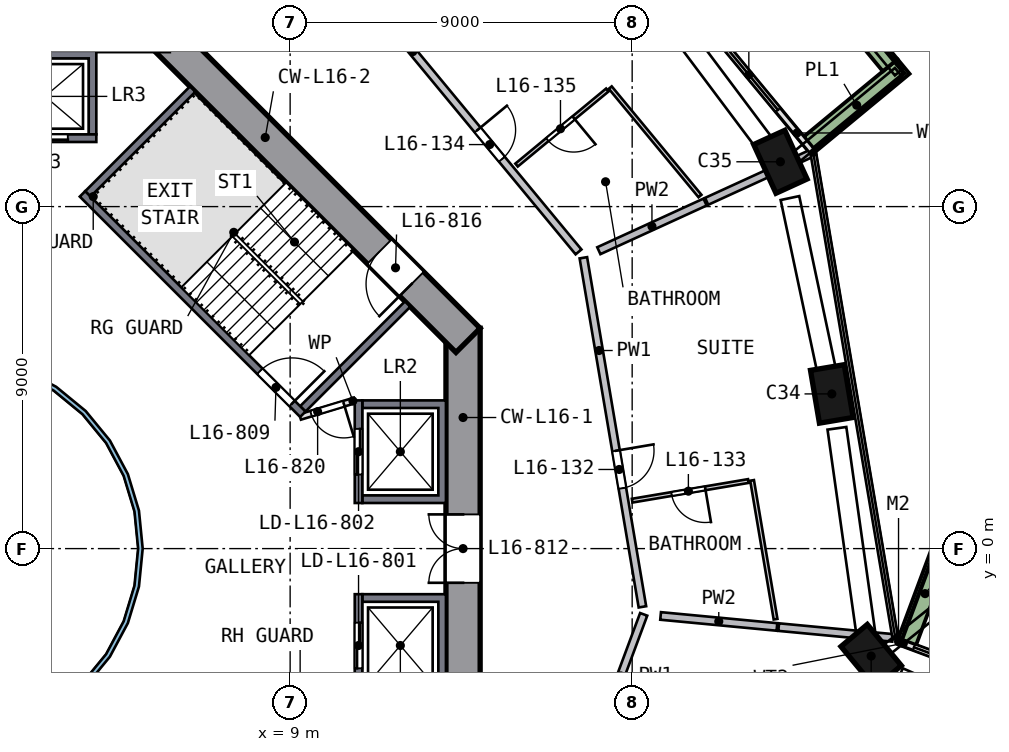
"""IFC4 building model, lengths in metres.
Left out: names, types, materials, properties, quantities, classifications, styles, units other than length and angle.
Written with IfcOpenShell. Run it as: python <this file> out.ifc"""

import sys

from ifc_helpers import new_model, si_unit, direction, frame, frame_2d, origin, origin_2d, place, context, subcontext, project, spatial, polyline, rectangle, outline, extrude, element, fill, save


model = new_model("IFC4")
c1 = context("Model", 3, precision=1e-05, world=origin(), true_north=direction((0.0, 1.0)))
c2 = subcontext(c1, "Body", "Model", "MODEL_VIEW")
j1 = project(units=[si_unit("LENGTHUNIT", "METRE"), si_unit("PLANEANGLEUNIT", "RADIAN")], contexts=[c1])
p1 = place(None, origin())
s1 = spatial("IfcSite", under=j1, at=p1, CompositionType="ELEMENT")
p2 = place(p1, origin())
s2 = spatial("IfcBuilding", under=s1, at=p2, CompositionType="ELEMENT")
p3 = place(p2, frame((0.0, 0.0, 71.5)))
s3 = spatial("IfcBuildingStorey", under=s2, at=p3, CompositionType="ELEMENT", Elevation=71.5)
p4 = place(p3, frame((24.273, -2.967, 0.0), z_axis=(0.013094218, 0.115503939, 0.993220711), x_axis=(0.640850903, -0.763450363, 0.080334694)))
e1 = element("IfcColumn", 1, at=p4, inside=s3, PredefinedType="COLUMN", context=c2, shape_type="SweptSolid", body=[
    extrude(rectangle(XDim=1.4, YDim=0.9, at=origin_2d()), origin(), (0.0, 0.0, 1.0), 3.021),
])
p5 = place(p3, frame((23.278, 3.937, 0.0), z_axis=(-0.019569342, 0.110623387, 0.993669717), x_axis=(-0.164784415, 0.979911476, -0.112336973)))
e2 = element("IfcColumn", 2, at=p5, inside=s3, PredefinedType="COLUMN", context=c2, shape_type="SweptSolid", body=[
    extrude(rectangle(XDim=1.4, YDim=0.9, at=origin_2d()), origin(), (0.0, 0.0, 1.0), 3.019),
])
p6 = place(p3, frame((21.959, 10.054, 0.0), z_axis=(-0.048666634, 0.104043119, 0.993381391), x_axis=(0.413236233, -0.903351173, 0.114858494)))
e3 = element("IfcColumn", 3, at=p6, inside=s3, PredefinedType="COLUMN", context=c2, shape_type="SweptSolid", body=[
    extrude(rectangle(XDim=1.4, YDim=0.9, at=origin_2d()), origin(), (0.0, 0.0, 1.0), 3.02),
])
p7 = place(p3, frame((13.55, -5.799, 0.0), z_axis=(0.0, 0.0, 1.0), x_axis=(0.0, 1.0, 0.0)))
e4 = element("IfcWall", 4, at=p7, inside=s3, PredefinedType="SHEAR", context=c2, shape_type="SweptSolid", body=[
    extrude(rectangle(XDim=11.598, YDim=0.9, at=frame_2d((5.799, 0.0))), origin(), (0.0, 0.0, 1.0), 3.5),
])
p8 = place(p7, frame((4.899, 0.0, 0.0)))
e5 = element("IfcOpeningElement", 5, at=p8, cuts=e4, PredefinedType="OPENING", context=c2, shape_type="SweptSolid", body=[
    extrude(rectangle(XDim=1.8, YDim=2.1, at=frame_2d((0.9, 1.05))), frame((0.0, 0.46, 0.0), z_axis=(0.0, -1.0, 0.0), x_axis=(1.0, 0.0, 0.0)), (0.0, 0.0, 1.0), 0.92),
])
p9 = place(p3, frame((13.682, 5.481, 0.0), z_axis=(0.0, 0.0, 1.0), x_axis=(-0.707106781, 0.707106781, 0.0)))
e6 = element("IfcWall", 6, at=p9, inside=s3, PredefinedType="SHEAR", context=c2, shape_type="SweptSolid", body=[
    extrude(rectangle(XDim=11.598, YDim=0.9, at=frame_2d((5.799, 0.0))), origin(), (0.0, 0.0, 1.0), 3.5),
])
p10 = place(p9, frame((2.099, 0.0, 0.0)))
e7 = element("IfcOpeningElement", 7, at=p10, cuts=e6, PredefinedType="OPENING", context=c2, shape_type="SweptSolid", body=[
    extrude(rectangle(XDim=1.2, YDim=2.1, at=frame_2d((0.6, 1.05))), frame((0.0, 0.46, 0.0), z_axis=(0.0, -1.0, 0.0), x_axis=(1.0, 0.0, 0.0)), (0.0, 0.0, 1.0), 0.92),
])
p11 = place(p3, frame((27.198, -3.26, 0.0), z_axis=(0.0, 0.0, 1.0), x_axis=(-0.93731138, 0.348493008, 0.0)))
e8 = element("IfcWall", 8, at=p11, inside=s3, PredefinedType="SOLIDWALL", context=c2, shape_type="SweptSolid", body=[
    extrude(rectangle(XDim=2.3, YDim=0.15, at=frame_2d((1.15, 0.0))), origin(), (0.0, 0.0, 1.0), 2.935),
])
p12 = place(p11, frame((0.4, 0.0, 0.0)))
e9 = element("IfcOpeningElement", 9, at=p12, cuts=e8, PredefinedType="OPENING", context=c2, shape_type="SweptSolid", body=[
    extrude(rectangle(XDim=1.5, YDim=2.4, at=frame_2d((0.75, 1.2))), frame((0.0, 0.085, 0.0), z_axis=(0.0, -1.0, 0.0), x_axis=(1.0, 0.0, 0.0)), (0.0, 0.0, 1.0), 0.17),
])
p13 = place(p3, frame((22.713, 10.484, 0.0), z_axis=(0.0, 0.0, 1.0), x_axis=(-0.63739785, 0.770534867, 0.0)))
e10 = element("IfcWall", 10, at=p13, inside=s3, PredefinedType="SOLIDWALL", context=c2, shape_type="SweptSolid", body=[
    extrude(rectangle(XDim=4.177, YDim=0.15, at=frame_2d((2.089, 0.0))), origin(), (0.0, 0.0, 1.0), 2.935),
])
p14 = place(p13, frame((1.377, 0.0, 0.0)))
e11 = element("IfcOpeningElement", 11, at=p14, cuts=e10, PredefinedType="OPENING", context=c2, shape_type="SweptSolid", body=[
    extrude(rectangle(XDim=2.4, YDim=2.4, at=frame_2d((1.2, 1.2))), frame((0.0, 0.085, 0.0), z_axis=(0.0, -1.0, 0.0), x_axis=(1.0, 0.0, 0.0)), (0.0, 0.0, 1.0), 0.17),
])
p15 = place(p3, frame((26.178, 0.08, 0.0), z_axis=(0.0, 0.0, 1.0), x_axis=(-0.348524904, -0.937299521, 0.0)))
e12 = element("IfcWall", 12, at=p15, inside=s3, PredefinedType="SOLIDWALL", context=c2, shape_type="SweptSolid", body=[
    extrude(rectangle(XDim=2.699, YDim=0.5, at=frame_2d((1.35, 0.0))), origin(), (0.0, 0.0, 1.0), 0.7),
])
p16 = place(p3, frame((22.676, 10.648, 0.0), z_axis=(0.0, 0.0, 1.0), x_axis=(0.770480916, 0.637463064, 0.0)))
e13 = element("IfcWall", 13, at=p16, inside=s3, PredefinedType="SOLIDWALL", context=c2, shape_type="SweptSolid", body=[
    extrude(rectangle(XDim=3.199, YDim=0.5, at=frame_2d((1.6, 0.0))), origin(), (0.0, 0.0, 1.0), 0.7),
])
p17 = place(p3, frame((24.789, 12.72, 0.0), z_axis=(0.0, 0.0, 1.0), x_axis=(-0.637429031, 0.770509073, 0.0)))
e14 = element("IfcWall", 14, at=p17, inside=s3, PredefinedType="SOLIDWALL", context=c2, shape_type="SweptSolid", body=[
    extrude(rectangle(XDim=13.223, YDim=0.5, at=frame_2d((6.612, 0.0))), origin(), (0.0, 0.0, 1.0), 0.7),
])
p18 = place(p3, origin())
e15 = element("IfcWall", 15, at=p18, inside=s3, PredefinedType="SOLIDWALL", context=c2, shape_type="SweptSolid", body=[
    extrude(outline(polyline([(13.1, -3.9), (10.9, -3.9), (10.9, -3.7), (12.9, -3.7), (12.9, -1.4), (10.9, -1.4), (10.9, -1.2), (13.1, -1.2), (13.1, -3.9)])), origin(), (0.0, 0.0, 1.0), 3.0),
])
p19 = place(p3, frame((10.8, -1.2, 0.0), z_axis=(0.0, 0.0, 1.0), x_axis=(0.0, -1.0, 0.0)))
e16 = element("IfcWall", 16, at=p19, inside=s3, PredefinedType="SOLIDWALL", context=c2, shape_type="SweptSolid", body=[
    extrude(rectangle(XDim=2.7, YDim=0.2, at=frame_2d((1.35, 0.0))), origin(), (0.0, 0.0, 1.0), 3.0),
])
p20 = place(p19, frame((0.75, 0.0, 0.0)))
e17 = element("IfcOpeningElement", 17, at=p20, cuts=e16, PredefinedType="OPENING", context=c2, shape_type="SweptSolid", body=[
    extrude(rectangle(XDim=1.2, YDim=2.1, at=frame_2d((0.6, 1.05))), frame((0.0, 0.11, 0.0), z_axis=(0.0, -1.0, 0.0), x_axis=(1.0, 0.0, 0.0)), (0.0, 0.0, 1.0), 0.22),
])
p21 = place(p3, origin())
e18 = element("IfcWall", 18, at=p21, inside=s3, PredefinedType="SOLIDWALL", context=c2, shape_type="SweptSolid", body=[
    extrude(outline(polyline([(13.1, 3.9), (13.1, 1.2), (10.9, 1.2), (10.9, 1.4), (12.9, 1.4), (12.9, 3.7), (10.9, 3.7), (10.9, 3.9), (13.1, 3.9)])), origin(), (0.0, 0.0, 1.0), 3.0),
])
p22 = place(p3, frame((10.8, 1.2, 0.0), z_axis=(0.0, 0.0, 1.0), x_axis=(0.0, 1.0, 0.0)))
e19 = element("IfcWall", 19, at=p22, inside=s3, PredefinedType="SOLIDWALL", context=c2, shape_type="SweptSolid", body=[
    extrude(rectangle(XDim=2.7, YDim=0.2, at=frame_2d((1.35, 0.0))), origin(), (0.0, 0.0, 1.0), 3.0),
])
p23 = place(p22, frame((0.75, 0.0, 0.0)))
e20 = element("IfcOpeningElement", 20, at=p23, cuts=e19, PredefinedType="OPENING", context=c2, shape_type="SweptSolid", body=[
    extrude(rectangle(XDim=1.2, YDim=2.1, at=frame_2d((0.6, 1.05))), frame((0.0, 0.11, 0.0), z_axis=(0.0, -1.0, 0.0), x_axis=(1.0, 0.0, 0.0)), (0.0, 0.0, 1.0), 0.22),
])
p24 = place(p3, origin())
e21 = element("IfcWall", 21, at=p24, inside=s3, PredefinedType="SOLIDWALL", context=c2, shape_type="SweptSolid", body=[
    extrude(outline(polyline([(3.9, 13.1), (3.9, 10.9), (3.7, 10.9), (3.7, 12.9), (1.4, 12.9), (1.4, 10.9), (1.2, 10.9), (1.2, 13.1), (3.9, 13.1)])), origin(), (0.0, 0.0, 1.0), 3.0),
])
p25 = place(p3, frame((1.2, 10.8, 0.0), z_axis=(0.0, 0.0, 1.0), x_axis=(1.0, 0.0, 0.0)))
e22 = element("IfcWall", 22, at=p25, inside=s3, PredefinedType="SOLIDWALL", context=c2, shape_type="SweptSolid", body=[
    extrude(rectangle(XDim=2.7, YDim=0.2, at=frame_2d((1.35, 0.0))), origin(), (0.0, 0.0, 1.0), 3.0),
])
p26 = place(p25, frame((0.75, 0.0, 0.0)))
e23 = element("IfcOpeningElement", 23, at=p26, cuts=e22, PredefinedType="OPENING", context=c2, shape_type="SweptSolid", body=[
    extrude(rectangle(XDim=1.2, YDim=2.1, at=frame_2d((0.6, 1.05))), frame((0.0, 0.11, 0.0), z_axis=(0.0, -1.0, 0.0), x_axis=(1.0, 0.0, 0.0)), (0.0, 0.0, 1.0), 0.22),
])
p27 = place(p3, frame((3.535, 9.334, 0.0), z_axis=(0.0, 0.0, 1.0), x_axis=(0.707106781, -0.707106781, 0.0)))
e24 = element("IfcWall", 24, at=p27, inside=s3, PredefinedType="SOLIDWALL", context=c2, shape_type="SweptSolid", body=[
    extrude(rectangle(XDim=8.2, YDim=0.2, at=frame_2d((4.1, 0.0))), origin(), (0.0, 0.0, 1.0), 3.0),
])
p28 = place(p27, frame((6.6, 0.0, 0.0)))
e25 = element("IfcOpeningElement", 25, at=p28, cuts=e24, PredefinedType="OPENING", context=c2, shape_type="SweptSolid", body=[
    extrude(rectangle(XDim=1.2, YDim=2.1, at=frame_2d((0.6, 1.05))), frame((0.0, 0.11, 0.0), z_axis=(0.0, -1.0, 0.0), x_axis=(1.0, 0.0, 0.0)), (0.0, 0.0, 1.0), 0.22),
])
for number, where, z_axis, x_axis in (
    (26, (9.334, 3.677, 0.0), (0.0, 0.0, 1.0), (0.707, 0.707, 0.0)),
    (27, (3.677, 9.334, 0.0), (0.0, 0.0, 1.0), (0.707, 0.707, 0.0)),
):
    element("IfcWall", number, at=place(p3, frame(where, z_axis=z_axis, x_axis=x_axis)), inside=s3, PredefinedType="SOLIDWALL", context=c2, shape_type="SweptSolid", body=[
        extrude(rectangle(XDim=3.9, YDim=0.2, at=frame_2d((1.95, 0.0))), origin(), (0.0, 0.0, 1.0), 3.0),
    ])
p29 = place(p3, frame((10.7, 3.9, 0.0), z_axis=(0.0, 0.0, 1.0), x_axis=(-0.957084567, -0.289808785, 0.0)))
e28 = element("IfcWall", 28, at=p29, inside=s3, PredefinedType="PARTITIONING", context=c2, shape_type="SweptSolid", body=[
    extrude(rectangle(XDim=1.501, YDim=0.15, at=frame_2d((0.75, 0.0))), origin(), (0.0, 0.0, 1.0), 3.0),
])
p30 = place(p29, frame((0.301, 0.0, 0.0)))
e29 = element("IfcOpeningElement", 29, at=p30, cuts=e28, PredefinedType="OPENING", context=c2, shape_type="SweptSolid", body=[
    extrude(rectangle(XDim=0.9, YDim=2.1, at=frame_2d((0.45, 1.05))), frame((0.0, 0.085, 0.0), z_axis=(0.0, -1.0, 0.0), x_axis=(1.0, 0.0, 0.0)), (0.0, 0.0, 1.0), 0.17),
])
p31 = place(p3, origin())
e30 = element("IfcWall", 30, at=p31, inside=s3, PredefinedType="SOLIDWALL", context=c2, shape_type="SweptSolid", body=[
    extrude(outline(polyline([(5.021, -0.999), (4.73, -1.959), (4.257, -2.844), (3.62, -3.62), (2.844, -4.257), (1.959, -4.73), (0.999, -5.021), (0.0, -5.12), (-0.999, -5.021), (-1.959, -4.73), (-2.844, -4.257), (-3.62, -3.62), (-4.257, -2.844), (-4.73, -1.959), (-5.021, -0.999), (-5.12, 0.0), (-5.021, 0.999), (-4.73, 1.959), (-4.257, 2.844), (-3.62, 3.62), (-2.844, 4.257), (-1.959, 4.73), (-0.999, 5.021), (0.0, 5.12), (0.999, 5.021), (1.959, 4.73), (2.844, 4.257), (3.62, 3.62), (4.257, 2.844), (4.73, 1.959), (5.021, 0.999), (5.12, 0.0), (5.021, -0.999)]), holes=[polyline([(4.904, 0.976), (4.619, 1.913), (4.157, 2.778), (3.535, 3.535), (2.778, 4.157), (1.913, 4.619), (0.976, 4.904), (0.0, 5.0), (-0.976, 4.904), (-1.913, 4.619), (-2.778, 4.157), (-3.535, 3.535), (-4.157, 2.778), (-4.619, 1.913), (-4.904, 0.976), (-5.0, 0.0), (-4.904, -0.976), (-4.619, -1.913), (-4.157, -2.778), (-3.535, -3.535), (-2.778, -4.157), (-1.913, -4.619), (-0.976, -4.904), (0.0, -5.0), (0.976, -4.904), (1.913, -4.619), (2.778, -4.157), (3.535, -3.535), (4.157, -2.778), (4.619, -1.913), (4.904, -0.976), (5.0, 0.0), (4.904, 0.976)])]), origin(), (0.0, 0.0, 1.0), 3.0),
])
p32 = place(p3, frame((10.65, 14.986, 0.0), z_axis=(0.0, 0.0, 1.0), x_axis=(0.637416992, -0.770519032, 0.0)))
e31 = element("IfcWall", 31, at=p32, inside=s3, PredefinedType="SOLIDWALL", context=c2, shape_type="SweptSolid", body=[
    extrude(rectangle(XDim=9.316, YDim=0.2, at=frame_2d((4.658, 0.0))), origin(), (0.0, 0.0, 1.0), 3.0),
])
p33 = place(p32, frame((5.15, 0.0, 0.0)))
e32 = element("IfcOpeningElement", 32, at=p33, cuts=e31, PredefinedType="OPENING", context=c2, shape_type="SweptSolid", body=[
    extrude(rectangle(XDim=1.0, YDim=2.1, at=frame_2d((0.5, 1.05))), frame((0.0, 0.11, 0.0), z_axis=(0.0, -1.0, 0.0), x_axis=(1.0, 0.0, 0.0)), (0.0, 0.0, 1.0), 0.22),
])
p34 = place(p3, frame((16.716, 7.653, 0.0), z_axis=(0.0, 0.0, 1.0), x_axis=(0.166765417, -0.9859966, 0.0)))
e33 = element("IfcWall", 33, at=p34, inside=s3, PredefinedType="SOLIDWALL", context=c2, shape_type="SweptSolid", body=[
    extrude(rectangle(XDim=9.317, YDim=0.2, at=frame_2d((4.658, 0.0))), origin(), (0.0, 0.0, 1.0), 3.0),
])
p35 = place(p34, frame((5.15, 0.0, 0.0)))
e34 = element("IfcOpeningElement", 34, at=p35, cuts=e33, PredefinedType="OPENING", context=c2, shape_type="SweptSolid", body=[
    extrude(rectangle(XDim=1.0, YDim=2.1, at=frame_2d((0.5, 1.05))), frame((0.0, 0.11, 0.0), z_axis=(0.0, -1.0, 0.0), x_axis=(1.0, 0.0, 0.0)), (0.0, 0.0, 1.0), 0.22),
])
p36 = place(p3, frame((17.098, -4.972, 0.0), z_axis=(0.0, 0.0, 1.0), x_axis=(0.348592386, 0.937274425, 0.0)))
e35 = element("IfcWall", 35, at=p36, inside=s3, PredefinedType="SOLIDWALL", context=c2, shape_type="SweptSolid", body=[
    extrude(rectangle(XDim=3.458, YDim=0.2, at=frame_2d((1.729, 0.0))), origin(), (0.0, 0.0, 1.0), 3.0),
])
p37 = place(p3, frame((17.123, 7.839, 0.0), z_axis=(0.0, 0.0, 1.0), x_axis=(0.909226405, 0.416301986, 0.0)))
e36 = element("IfcWall", 36, at=p37, inside=s3, PredefinedType="SOLIDWALL", context=c2, shape_type="SweptSolid", body=[
    extrude(rectangle(XDim=3.075, YDim=0.2, at=frame_2d((1.537, 0.0))), origin(), (0.0, 0.0, 1.0), 3.0),
])
p38 = place(p3, frame((18.748, -1.772, 0.0), z_axis=(0.0, 0.0, 1.0), x_axis=(0.995564081, -0.094085927, 0.0)))
e37 = element("IfcWall", 37, at=p38, inside=s3, PredefinedType="SOLIDWALL", context=c2, shape_type="SweptSolid", body=[
    extrude(rectangle(XDim=3.075, YDim=0.2, at=frame_2d((1.538, 0.0))), origin(), (0.0, 0.0, 1.0), 3.0),
])
for number, where, z_axis, x_axis in (
    (38, (19.96, 9.138, 0.0), (0.0, 0.0, 1.0), (0.909, 0.416, 0.0)),
    (39, (21.855, -2.066, 0.0), (0.0, 0.0, 1.0), (0.996, -0.094, 0.0)),
):
    element("IfcWall", number, at=place(p3, frame(where, z_axis=z_axis, x_axis=x_axis)), inside=s3, PredefinedType="SOLIDWALL", context=c2, shape_type="SweptSolid", body=[
        extrude(rectangle(XDim=3.011, YDim=0.2, at=frame_2d((1.506, 0.0))), origin(), (0.0, 0.0, 1.0), 3.0),
    ])
p39 = place(p3, frame((17.346, 12.068, 0.0), z_axis=(0.0, 0.0, 1.0), x_axis=(-0.770482353, -0.637461327, 0.0)))
e40 = element("IfcWall", 40, at=p39, inside=s3, PredefinedType="PARTITIONING", context=c2, shape_type="SweptSolid", body=[
    extrude(rectangle(XDim=3.1, YDim=0.1, at=frame_2d((1.55, 0.0))), origin(), (0.0, 0.0, 1.0), 3.0),
])
p40 = place(p39, frame((1.15, 0.0, 0.0)))
e41 = element("IfcOpeningElement", 41, at=p40, cuts=e40, PredefinedType="OPENING", context=c2, shape_type="SweptSolid", body=[
    extrude(rectangle(XDim=0.9, YDim=2.1, at=frame_2d((0.45, 1.05))), frame((0.0, 0.06, 0.0), z_axis=(0.0, -1.0, 0.0), x_axis=(1.0, 0.0, 0.0)), (0.0, 0.0, 1.0), 0.12),
])
p41 = place(p3, frame((17.424, 12.132, 0.0), z_axis=(0.0, 0.0, 1.0), x_axis=(0.637431462, -0.770507061, 0.0)))
e42 = element("IfcWall", 42, at=p41, inside=s3, PredefinedType="PARTITIONING", context=c2, shape_type="SweptSolid", body=[
    extrude(rectangle(XDim=3.704, YDim=0.1, at=frame_2d((1.852, 0.0))), origin(), (0.0, 0.0, 1.0), 3.0),
])
p42 = place(p3, frame((21.057, 1.778, 0.0), z_axis=(0.0, 0.0, 1.0), x_axis=(-0.98599085, -0.166799411, 0.0)))
e43 = element("IfcWall", 43, at=p42, inside=s3, PredefinedType="PARTITIONING", context=c2, shape_type="SweptSolid", body=[
    extrude(rectangle(XDim=3.1, YDim=0.1, at=frame_2d((1.55, 0.0))), origin(), (0.0, 0.0, 1.0), 3.0),
])
p43 = place(p42, frame((1.15, 0.0, 0.0)))
e44 = element("IfcOpeningElement", 44, at=p43, cuts=e43, PredefinedType="OPENING", context=c2, shape_type="SweptSolid", body=[
    extrude(rectangle(XDim=0.9, YDim=2.1, at=frame_2d((0.45, 1.05))), frame((0.0, 0.06, 0.0), z_axis=(0.0, -1.0, 0.0), x_axis=(1.0, 0.0, 0.0)), (0.0, 0.0, 1.0), 0.12),
])
p44 = place(p3, frame((21.155, 1.795, 0.0), z_axis=(0.0, 0.0, 1.0), x_axis=(0.16674987, -0.98599923, 0.0)))
e45 = element("IfcWall", 45, at=p44, inside=s3, PredefinedType="PARTITIONING", context=c2, shape_type="SweptSolid", body=[
    extrude(rectangle(XDim=3.704, YDim=0.1, at=frame_2d((1.852, 0.0))), origin(), (0.0, 0.0, 1.0), 3.0),
])
p45 = place(p12, origin())
e46 = element("IfcDoor", 46, at=p45, inside=s3, OperationType="SLIDING_TO_RIGHT", PredefinedType="DOOR", context=c2, shape_type="SweptSolid", body=[
    extrude(rectangle(XDim=1.5, YDim=2.4, at=frame_2d((0.75, 1.2))), frame((0.0, 0.025, 0.0), z_axis=(0.0, -1.0, 0.0), x_axis=(1.0, 0.0, 0.0)), (0.0, 0.0, 1.0), 0.05),
])
fill(e9, e46)
p46 = place(p14, origin())
e47 = element("IfcDoor", 47, at=p46, inside=s3, OperationType="SLIDING_TO_LEFT", PredefinedType="DOOR", context=c2, shape_type="SweptSolid", body=[
    extrude(rectangle(XDim=2.4, YDim=2.4, at=frame_2d((1.2, 1.2))), frame((0.0, 0.025, 0.0), z_axis=(0.0, -1.0, 0.0), x_axis=(1.0, 0.0, 0.0)), (0.0, 0.0, 1.0), 0.05),
])
fill(e11, e47)
p47 = place(p20, origin())
e48 = element("IfcDoor", 48, at=p47, inside=s3, OperationType="DOUBLE_DOOR_SLIDING", PredefinedType="DOOR", context=c2, shape_type="SweptSolid", body=[
    extrude(rectangle(XDim=1.2, YDim=2.1, at=frame_2d((0.6, 1.05))), frame((0.0, 0.025, 0.0), z_axis=(0.0, -1.0, 0.0), x_axis=(1.0, 0.0, 0.0)), (0.0, 0.0, 1.0), 0.05),
])
fill(e17, e48)
p48 = place(p23, origin())
e49 = element("IfcDoor", 49, at=p48, inside=s3, OperationType="DOUBLE_DOOR_SLIDING", PredefinedType="DOOR", context=c2, shape_type="SweptSolid", body=[
    extrude(rectangle(XDim=1.2, YDim=2.1, at=frame_2d((0.6, 1.05))), frame((0.0, 0.025, 0.0), z_axis=(0.0, -1.0, 0.0), x_axis=(1.0, 0.0, 0.0)), (0.0, 0.0, 1.0), 0.05),
])
fill(e20, e49)
p49 = place(p26, origin())
e50 = element("IfcDoor", 50, at=p49, inside=s3, OperationType="DOUBLE_DOOR_SLIDING", PredefinedType="DOOR", context=c2, shape_type="SweptSolid", body=[
    extrude(rectangle(XDim=1.2, YDim=2.1, at=frame_2d((0.6, 1.05))), frame((0.0, 0.025, 0.0), z_axis=(0.0, -1.0, 0.0), x_axis=(1.0, 0.0, 0.0)), (0.0, 0.0, 1.0), 0.05),
])
fill(e23, e50)
p50 = place(p28, origin())
e51 = element("IfcDoor", 51, at=p50, inside=s3, OperationType="SINGLE_SWING_RIGHT", PredefinedType="DOOR", context=c2, shape_type="SweptSolid", body=[
    extrude(rectangle(XDim=1.2, YDim=2.1, at=frame_2d((0.6, 1.05))), frame((0.0, 0.025, 0.0), z_axis=(0.0, -1.0, 0.0), x_axis=(1.0, 0.0, 0.0)), (0.0, 0.0, 1.0), 0.05),
])
fill(e25, e51)
p51 = place(p8, origin())
e52 = element("IfcDoor", 52, at=p51, inside=s3, OperationType="DOUBLE_DOOR_SINGLE_SWING", PredefinedType="DOOR", context=c2, shape_type="SweptSolid", body=[
    extrude(rectangle(XDim=1.8, YDim=2.1, at=frame_2d((0.9, 1.05))), frame((0.0, 0.025, 0.0), z_axis=(0.0, -1.0, 0.0), x_axis=(1.0, 0.0, 0.0)), (0.0, 0.0, 1.0), 0.05),
])
fill(e5, e52)
p52 = place(p10, origin())
e53 = element("IfcDoor", 53, at=p52, inside=s3, OperationType="SINGLE_SWING_LEFT", PredefinedType="DOOR", context=c2, shape_type="SweptSolid", body=[
    extrude(rectangle(XDim=1.2, YDim=2.1, at=frame_2d((0.6, 1.05))), frame((0.0, 0.025, 0.0), z_axis=(0.0, -1.0, 0.0), x_axis=(1.0, 0.0, 0.0)), (0.0, 0.0, 1.0), 0.05),
])
fill(e7, e53)
p53 = place(p30, origin())
e54 = element("IfcDoor", 54, at=p53, inside=s3, OperationType="SINGLE_SWING_LEFT", PredefinedType="DOOR", context=c2, shape_type="SweptSolid", body=[
    extrude(rectangle(XDim=0.9, YDim=2.1, at=frame_2d((0.45, 1.05))), frame((0.0, 0.025, 0.0), z_axis=(0.0, -1.0, 0.0), x_axis=(1.0, 0.0, 0.0)), (0.0, 0.0, 1.0), 0.05),
])
fill(e29, e54)
p54 = place(p35, origin())
e55 = element("IfcDoor", 55, at=p54, inside=s3, OperationType="SINGLE_SWING_LEFT", PredefinedType="DOOR", context=c2, shape_type="SweptSolid", body=[
    extrude(rectangle(XDim=1.0, YDim=2.1, at=frame_2d((0.5, 1.05))), frame((0.0, 0.025, 0.0), z_axis=(0.0, -1.0, 0.0), x_axis=(1.0, 0.0, 0.0)), (0.0, 0.0, 1.0), 0.05),
])
fill(e34, e55)
p55 = place(p43, origin())
e56 = element("IfcDoor", 56, at=p55, inside=s3, OperationType="SINGLE_SWING_LEFT", PredefinedType="DOOR", context=c2, shape_type="SweptSolid", body=[
    extrude(rectangle(XDim=0.9, YDim=2.1, at=frame_2d((0.45, 1.05))), frame((0.0, 0.025, 0.0), z_axis=(0.0, -1.0, 0.0), x_axis=(1.0, 0.0, 0.0)), (0.0, 0.0, 1.0), 0.05),
])
fill(e44, e56)
p56 = place(p33, origin())
e57 = element("IfcDoor", 57, at=p56, inside=s3, OperationType="SINGLE_SWING_LEFT", PredefinedType="DOOR", context=c2, shape_type="SweptSolid", body=[
    extrude(rectangle(XDim=1.0, YDim=2.1, at=frame_2d((0.5, 1.05))), frame((0.0, 0.025, 0.0), z_axis=(0.0, -1.0, 0.0), x_axis=(1.0, 0.0, 0.0)), (0.0, 0.0, 1.0), 0.05),
])
fill(e32, e57)
p57 = place(p40, origin())
e58 = element("IfcDoor", 58, at=p57, inside=s3, OperationType="SINGLE_SWING_LEFT", PredefinedType="DOOR", context=c2, shape_type="SweptSolid", body=[
    extrude(rectangle(XDim=0.9, YDim=2.1, at=frame_2d((0.45, 1.05))), frame((0.0, 0.025, 0.0), z_axis=(0.0, -1.0, 0.0), x_axis=(1.0, 0.0, 0.0)), (0.0, 0.0, 1.0), 0.05),
])
fill(e41, e58)
save(model, sys.argv[1])
